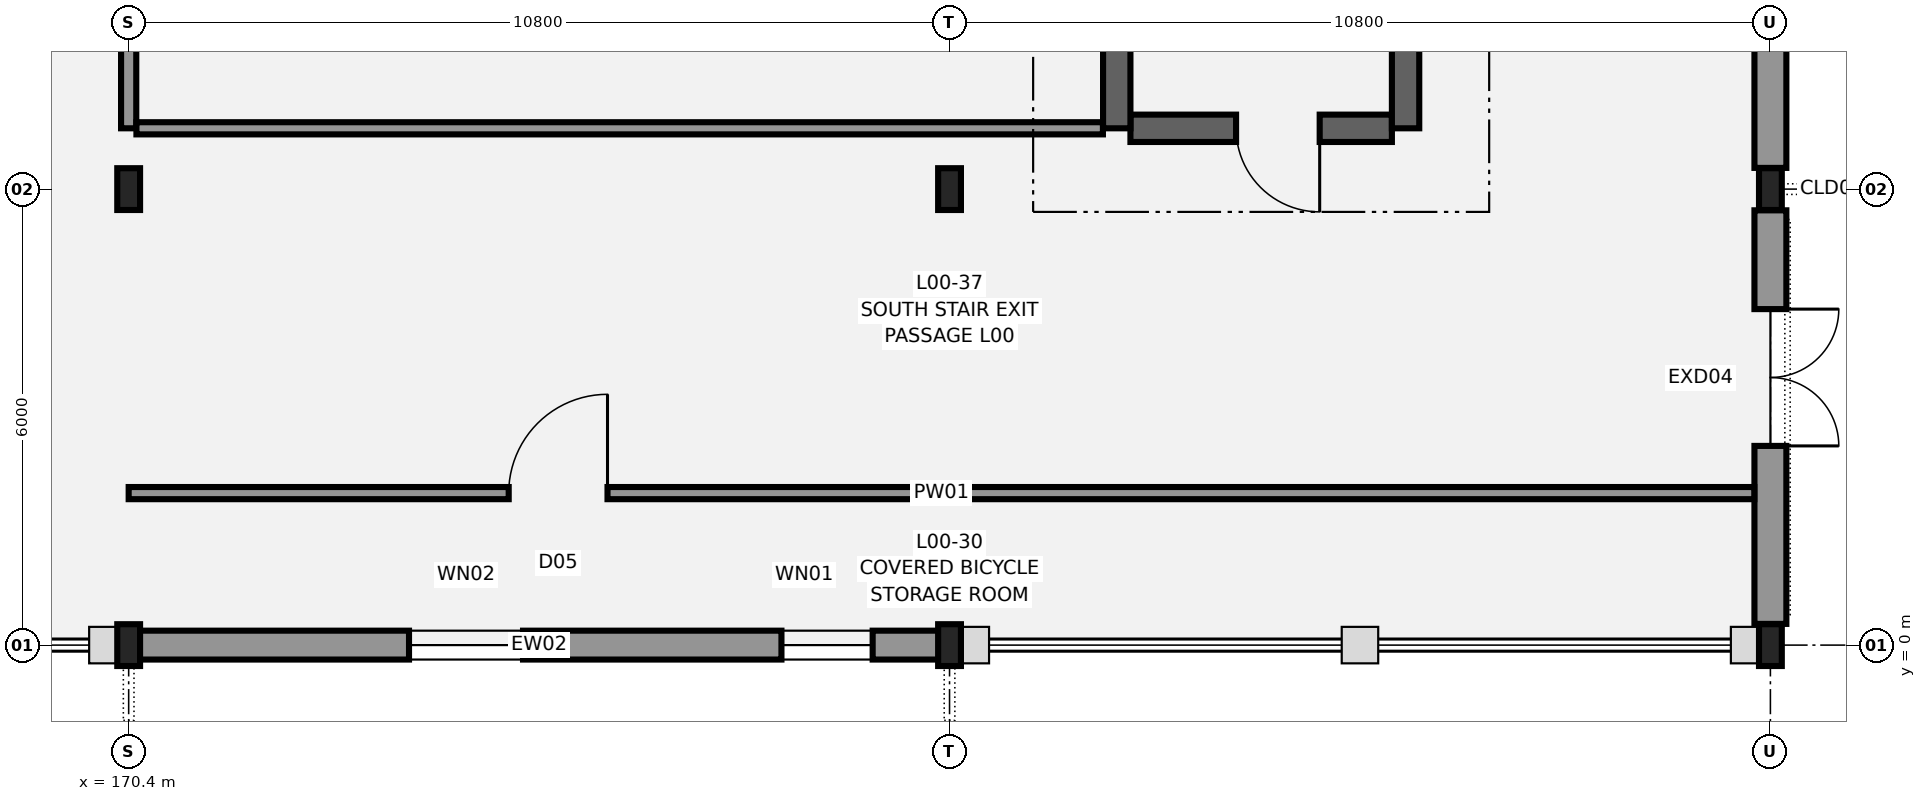
"""IFC4 building model, lengths in metres.
Left out: names, types, materials, properties, quantities, classifications, styles, units other than length and angle.
Written with IfcOpenShell. Run it as: python <this file> out.ifc"""

import sys

from ifc_helpers import new_model, si_unit, direction, frame, frame_2d, origin, origin_2d, place, context, subcontext, project, spatial, rectangle, i_section, extrude, element, fill, save


model = new_model("IFC4")
c1 = context("Model", 3, precision=1e-05, world=origin(), true_north=direction((0.0, 1.0)))
c2 = subcontext(c1, "Body", "Model", "MODEL_VIEW")
j1 = project(units=[si_unit("LENGTHUNIT", "METRE"), si_unit("PLANEANGLEUNIT", "RADIAN")], contexts=[c1])
p1 = place(None, origin())
s1 = spatial("IfcSite", under=j1, at=p1, CompositionType="ELEMENT")
p2 = place(p1, origin())
s2 = spatial("IfcBuilding", under=s1, at=p2, CompositionType="ELEMENT")
p3 = place(p2, origin())
s3 = spatial("IfcBuildingStorey", under=s2, at=p3, CompositionType="ELEMENT", Elevation=0.0)
for number, where, z_axis, x_axis in (
    (1, (170.4, 0.0, 0.0), (0.0, 0.0, 1.0), (1.0, 0.0, 0.0)),
    (2, (170.4, 6.0, 0.0), (0.0, 0.0, 1.0), (1.0, 0.0, 0.0)),
    (3, (181.2, 0.0, 0.0), (0.0, 0.0, 1.0), (1.0, 0.0, 0.0)),
    (4, (181.2, 6.0, 0.0), (0.0, 0.0, 1.0), (1.0, 0.0, 0.0)),
    (5, (192.0, 0.0, 0.0), (0.0, 0.0, 1.0), (1.0, 0.0, 0.0)),
    (6, (192.0, 6.0, 0.0), (0.0, 0.0, 1.0), (1.0, 0.0, 0.0)),
):
    element("IfcColumn", number, at=place(p3, frame(where, z_axis=z_axis, x_axis=x_axis)), inside=s3, PredefinedType="COLUMN", context=c2, shape_type="SweptSolid", body=[
        extrude(i_section(OverallWidth=0.3, OverallDepth=0.55, WebThickness=0.015, FlangeThickness=0.029, FilletRadius=0.027, at=origin_2d()), origin(), (0.0, 0.0, 1.0), 5.4),
    ])
p4 = place(p3, frame((187.02, 6.8, 0.0), z_axis=(0.0, 0.0, 1.0), x_axis=(-1.0, 0.0, 0.0)))
e7 = element("IfcWall", 7, at=p4, inside=s3, PredefinedType="SHEAR", context=c2, shape_type="SweptSolid", body=[
    extrude(rectangle(XDim=3.44, YDim=0.36, at=frame_2d((1.72, 0.0))), origin(), (0.0, 0.0, 1.0), 5.12),
])
p5 = place(p4, frame((0.95, 0.0, 0.0)))
e8 = element("IfcOpeningElement", 8, at=p5, cuts=e7, PredefinedType="OPENING", context=c2, shape_type="SweptSolid", body=[
    extrude(rectangle(XDim=1.1, YDim=2.15, at=frame_2d((0.55, 1.075))), frame((0.0, 0.19, 0.0), z_axis=(0.0, -1.0, 0.0), x_axis=(1.0, 0.0, 0.0)), (0.0, 0.0, 1.0), 0.38),
])
for number, where, z_axis, x_axis in (
    (9, (187.2, 6.8, 0.0), (0.0, 0.0, 1.0), (0.0, 1.0, 0.0)),
    (10, (183.4, 14.8, 0.0), (0.0, 0.0, 1.0), (0.0, -1.0, 0.0)),
):
    element("IfcWall", number, at=place(p3, frame(where, z_axis=z_axis, x_axis=x_axis)), inside=s3, PredefinedType="SHEAR", context=c2, shape_type="SweptSolid", body=[
        extrude(rectangle(XDim=8.0, YDim=0.36, at=frame_2d((4.0, 0.0))), origin(), (0.0, 0.0, 1.0), 5.12),
    ])
p6 = place(p3, frame((181.188, 0.0, 0.0), z_axis=(0.0, 0.0, 1.0), x_axis=(-1.0, 0.0, 0.0)))
e11 = element("IfcWall", 11, at=p6, inside=s3, PredefinedType="STANDARD", context=c2, shape_type="SweptSolid", body=[
    extrude(rectangle(XDim=10.777, YDim=0.38, at=frame_2d((5.388, 0.0))), origin(), (0.0, 0.0, 1.0), 4.665),
])
p7 = place(p6, frame((1.0, 0.0, 0.8)))
e12 = element("IfcOpeningElement", 12, at=p7, cuts=e11, PredefinedType="OPENING", context=c2, shape_type="SweptSolid", body=[
    extrude(rectangle(XDim=1.2, YDim=1.8, at=frame_2d((0.6, 0.9))), frame((0.0, 0.2, 0.0), z_axis=(0.0, -1.0, 0.0), x_axis=(1.0, 0.0, 0.0)), (0.0, 0.0, 1.0), 0.4),
])
p8 = place(p6, frame((5.6, 0.0, 0.8)))
e13 = element("IfcOpeningElement", 13, at=p8, cuts=e11, PredefinedType="OPENING", context=c2, shape_type="SweptSolid", body=[
    extrude(rectangle(XDim=1.5, YDim=1.8, at=frame_2d((0.75, 0.9))), frame((0.0, 0.2, 0.0), z_axis=(0.0, -1.0, 0.0), x_axis=(1.0, 0.0, 0.0)), (0.0, 0.0, 1.0), 0.4),
])
p9 = place(p3, frame((192.0, 5.721, 0.0), z_axis=(0.0, 0.0, 1.0), x_axis=(0.0, -1.0, 0.0)))
e14 = element("IfcWall", 14, at=p9, inside=s3, PredefinedType="STANDARD", context=c2, shape_type="SweptSolid", body=[
    extrude(rectangle(XDim=5.442, YDim=0.42, at=frame_2d((2.721, 0.0))), origin(), (0.0, 0.0, 1.0), 4.765),
])
p10 = place(p9, frame((1.3, 0.0, 0.0)))
e15 = element("IfcOpeningElement", 15, at=p10, cuts=e14, PredefinedType="OPENING", context=c2, shape_type="SweptSolid", body=[
    extrude(rectangle(XDim=1.8, YDim=2.3, at=frame_2d((0.9, 1.15))), frame((0.0, 0.22, 0.0), z_axis=(0.0, -1.0, 0.0), x_axis=(1.0, 0.0, 0.0)), (0.0, 0.0, 1.0), 0.44),
])
p11 = place(p3, frame((192.0, 15.321, 0.0), z_axis=(0.0, 0.0, 1.0), x_axis=(0.0, -1.0, 0.0)))
e16 = element("IfcWall", 16, at=p11, inside=s3, PredefinedType="STANDARD", context=c2, shape_type="SweptSolid", body=[
    extrude(rectangle(XDim=9.042, YDim=0.42, at=frame_2d((4.521, 0.0))), origin(), (0.0, 0.0, 1.0), 4.765),
])
p12 = place(p11, frame((2.6, 0.0, 0.0)))
e17 = element("IfcOpeningElement", 17, at=p12, cuts=e16, PredefinedType="OPENING", context=c2, shape_type="SweptSolid", body=[
    extrude(rectangle(XDim=2.2, YDim=2.4, at=frame_2d((1.1, 1.2))), frame((0.0, 0.22, 0.0), z_axis=(0.0, -1.0, 0.0), x_axis=(1.0, 0.0, 0.0)), (0.0, 0.0, 1.0), 0.44),
])
p13 = place(p3, frame((170.4, 2.0, 0.0), z_axis=(0.0, 0.0, 1.0), x_axis=(1.0, 0.0, 0.0)))
e18 = element("IfcWall", 18, at=p13, inside=s3, PredefinedType="PARTITIONING", context=c2, shape_type="SweptSolid", body=[
    extrude(rectangle(XDim=21.388, YDim=0.16, at=frame_2d((10.694, 0.0))), origin(), (0.0, 0.0, 1.0), 5.04),
])
p14 = place(p13, frame((5.0, 0.0, 0.0)))
e19 = element("IfcOpeningElement", 19, at=p14, cuts=e18, PredefinedType="OPENING", context=c2, shape_type="SweptSolid", body=[
    extrude(rectangle(XDim=1.3, YDim=2.15, at=frame_2d((0.65, 1.075))), frame((0.0, 0.09, 0.0), z_axis=(0.0, -1.0, 0.0), x_axis=(1.0, 0.0, 0.0)), (0.0, 0.0, 1.0), 0.18),
])
p15 = place(p3, frame((170.4, 6.8, 0.0), z_axis=(0.0, 0.0, 1.0), x_axis=(0.0, 1.0, 0.0)))
e20 = element("IfcWall", 20, at=p15, inside=s3, PredefinedType="PARTITIONING", context=c2, shape_type="SweptSolid", body=[
    extrude(rectangle(XDim=56.628, YDim=0.2, at=frame_2d((28.314, 0.0))), origin(), (0.0, 0.0, 1.0), 4.765),
])
p16 = place(p15, frame((3.2, 0.0, 0.0)))
e21 = element("IfcOpeningElement", 21, at=p16, cuts=e20, PredefinedType="OPENING", context=c2, shape_type="SweptSolid", body=[
    extrude(rectangle(XDim=1.22, YDim=2.15, at=frame_2d((0.61, 1.075))), frame((0.0, 0.11, 0.0), z_axis=(0.0, -1.0, 0.0), x_axis=(1.0, 0.0, 0.0)), (0.0, 0.0, 1.0), 0.22),
])
p17 = place(p15, frame((13.0, 0.0, 0.0)))
e22 = element("IfcOpeningElement", 22, at=p17, cuts=e20, PredefinedType="OPENING", context=c2, shape_type="SweptSolid", body=[
    extrude(rectangle(XDim=1.6, YDim=2.2, at=frame_2d((0.8, 1.1))), frame((0.0, 0.11, 0.0), z_axis=(0.0, -1.0, 0.0), x_axis=(1.0, 0.0, 0.0)), (0.0, 0.0, 1.0), 0.22),
])
p18 = place(p15, frame((26.0, 0.0, 0.0)))
e23 = element("IfcOpeningElement", 23, at=p18, cuts=e20, PredefinedType="OPENING", context=c2, shape_type="SweptSolid", body=[
    extrude(rectangle(XDim=1.5, YDim=2.15, at=frame_2d((0.75, 1.075))), frame((0.0, 0.11, 0.0), z_axis=(0.0, -1.0, 0.0), x_axis=(1.0, 0.0, 0.0)), (0.0, 0.0, 1.0), 0.22),
])
p19 = place(p15, frame((47.6, 0.0, 0.0)))
e24 = element("IfcOpeningElement", 24, at=p19, cuts=e20, PredefinedType="OPENING", context=c2, shape_type="SweptSolid", body=[
    extrude(rectangle(XDim=1.5, YDim=2.15, at=frame_2d((0.75, 1.075))), frame((0.0, 0.11, 0.0), z_axis=(0.0, -1.0, 0.0), x_axis=(1.0, 0.0, 0.0)), (0.0, 0.0, 1.0), 0.22),
])
p20 = place(p15, frame((53.2, 0.0, 0.0)))
e25 = element("IfcOpeningElement", 25, at=p20, cuts=e20, PredefinedType="OPENING", context=c2, shape_type="SweptSolid", body=[
    extrude(rectangle(XDim=1.02, YDim=2.12, at=frame_2d((0.51, 1.06))), frame((0.0, 0.11, 0.0), z_axis=(0.0, -1.0, 0.0), x_axis=(1.0, 0.0, 0.0)), (0.0, 0.0, 1.0), 0.22),
])
p21 = place(p15, frame((4.733, 0.0, 1.05)))
e26 = element("IfcOpeningElement", 26, at=p21, cuts=e20, PredefinedType="OPENING", context=c2, shape_type="SweptSolid", body=[
    extrude(rectangle(XDim=2.8, YDim=1.3, at=frame_2d((1.4, 0.65))), frame((0.0, 0.11, 0.0), z_axis=(0.0, -1.0, 0.0), x_axis=(1.0, 0.0, 0.0)), (0.0, 0.0, 1.0), 0.22),
])
p22 = place(p3, frame((170.502, 6.8, 0.0), z_axis=(0.0, 0.0, 1.0), x_axis=(1.0, 0.0, 0.0)))
e27 = element("IfcWall", 27, at=p22, inside=s3, PredefinedType="PARTITIONING", context=c2, shape_type="SweptSolid", body=[
    extrude(rectangle(XDim=12.716, YDim=0.16, at=frame_2d((6.358, 0.0))), origin(), (0.0, 0.0, 1.0), 5.04),
])
p23 = place(p7, origin())
e28 = element("IfcWindow", 28, at=p23, inside=s3, PartitioningType="SINGLE_PANEL", PredefinedType="WINDOW", context=c2, shape_type="SweptSolid", body=[
    extrude(rectangle(XDim=1.2, YDim=1.8, at=frame_2d((0.6, 0.9))), frame((0.0, 0.03, 0.0), z_axis=(0.0, -1.0, 0.0), x_axis=(1.0, 0.0, 0.0)), (0.0, 0.0, 1.0), 0.06),
])
fill(e12, e28)
p24 = place(p8, origin())
e29 = element("IfcWindow", 29, at=p24, inside=s3, PartitioningType="SINGLE_PANEL", PredefinedType="WINDOW", context=c2, shape_type="SweptSolid", body=[
    extrude(rectangle(XDim=1.5, YDim=1.8, at=frame_2d((0.75, 0.9))), frame((0.0, 0.03, 0.0), z_axis=(0.0, -1.0, 0.0), x_axis=(1.0, 0.0, 0.0)), (0.0, 0.0, 1.0), 0.06),
])
fill(e13, e29)
p25 = place(p10, origin())
e30 = element("IfcDoor", 30, at=p25, inside=s3, OperationType="DOUBLE_DOOR_SINGLE_SWING", PredefinedType="DOOR", context=c2, shape_type="SweptSolid", body=[
    extrude(rectangle(XDim=1.8, YDim=2.3, at=frame_2d((0.9, 1.15))), frame((0.0, 0.025, 0.0), z_axis=(0.0, -1.0, 0.0), x_axis=(1.0, 0.0, 0.0)), (0.0, 0.0, 1.0), 0.05),
])
fill(e15, e30)
p26 = place(p14, origin())
e31 = element("IfcDoor", 31, at=p26, inside=s3, OperationType="SINGLE_SWING_RIGHT", PredefinedType="DOOR", context=c2, shape_type="SweptSolid", body=[
    extrude(rectangle(XDim=1.3, YDim=2.15, at=frame_2d((0.65, 1.075))), frame((0.0, 0.025, 0.0), z_axis=(0.0, -1.0, 0.0), x_axis=(1.0, 0.0, 0.0)), (0.0, 0.0, 1.0), 0.05),
])
fill(e19, e31)
p27 = place(p5, origin())
e32 = element("IfcDoor", 32, at=p27, inside=s3, OperationType="SINGLE_SWING_LEFT", PredefinedType="DOOR", context=c2, shape_type="SweptSolid", body=[
    extrude(rectangle(XDim=1.1, YDim=2.15, at=frame_2d((0.55, 1.075))), frame((0.0, 0.025, 0.0), z_axis=(0.0, -1.0, 0.0), x_axis=(1.0, 0.0, 0.0)), (0.0, 0.0, 1.0), 0.05),
])
fill(e8, e32)
save(model, sys.argv[1])
